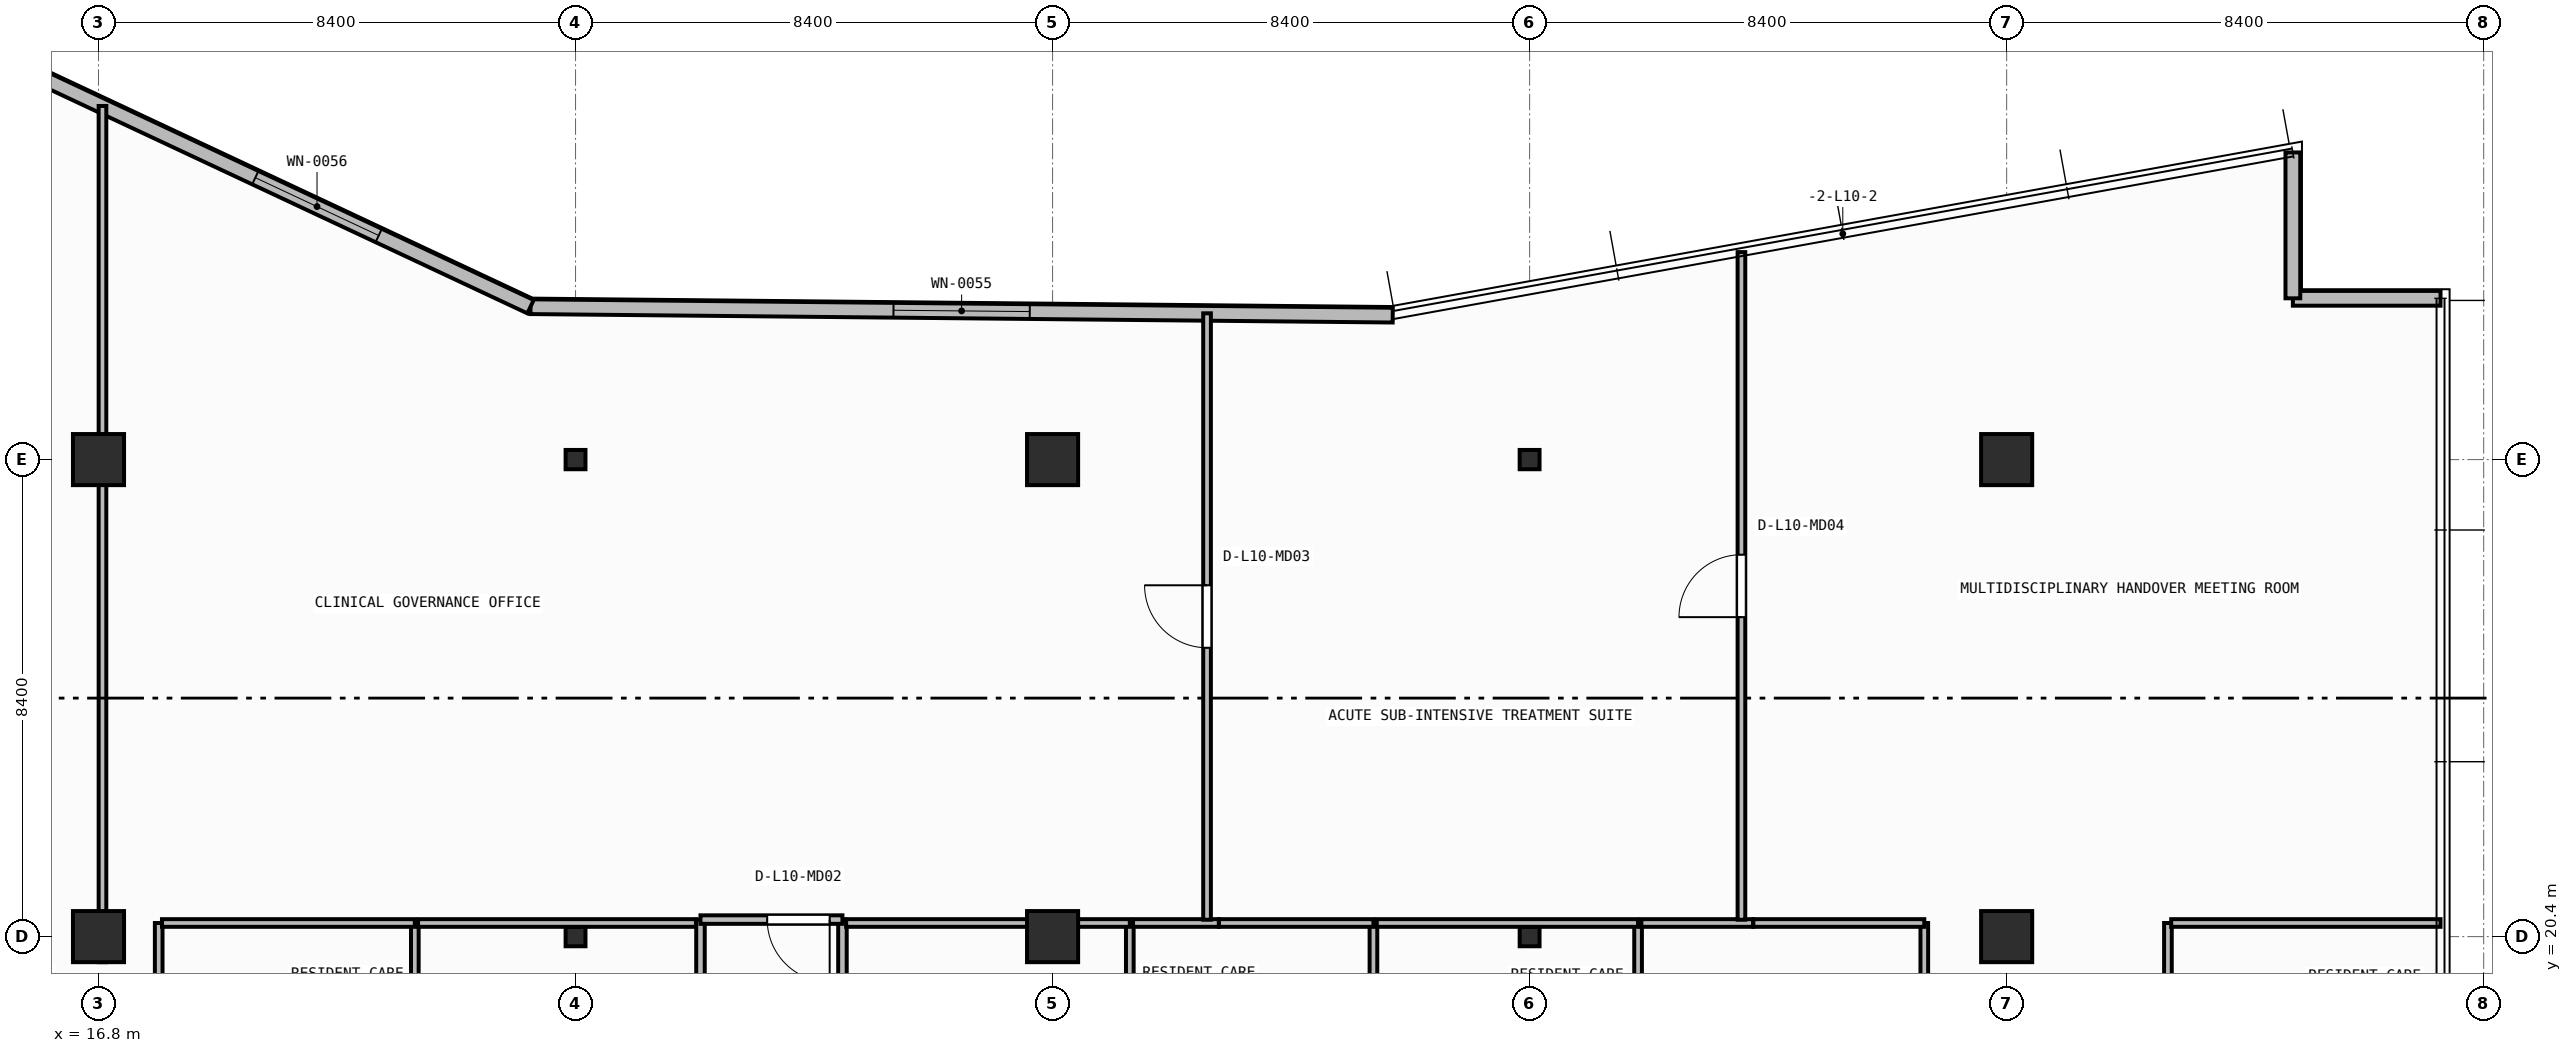
"""IFC4 building model, lengths in metres.
Left out: names, types, materials, properties, quantities, classifications, styles, units other than length and angle.
Written with IfcOpenShell. Run it as: python <this file> out.ifc"""

import sys

from ifc_helpers import new_model, si_unit, direction, frame, frame_2d, origin, origin_2d, place, context, subcontext, project, spatial, rectangle, i_section, extrude, element, fill, save


model = new_model("IFC4")
c1 = context("Model", 3, precision=1e-05, world=origin(), true_north=direction((0.0, 1.0)))
c2 = subcontext(c1, "Body", "Model", "MODEL_VIEW")
j1 = project(units=[si_unit("LENGTHUNIT", "METRE"), si_unit("PLANEANGLEUNIT", "RADIAN")], contexts=[c1])
p1 = place(None, origin())
s1 = spatial("IfcSite", under=j1, at=p1, CompositionType="ELEMENT")
p2 = place(p1, origin())
s2 = spatial("IfcBuilding", under=s1, at=p2, CompositionType="ELEMENT")
p3 = place(p2, frame((0.0, 0.0, 42.25)))
s3 = spatial("IfcBuildingStorey", under=s2, at=p3, CompositionType="ELEMENT", Elevation=42.25)
p4 = place(p3, frame((16.8, 20.4, 0.0), z_axis=(0.0, 0.0, 1.0), x_axis=(1.0, 0.0, 0.0)))
e1 = element("IfcColumn", 1, at=p4, inside=s3, PredefinedType="COLUMN", context=c2, shape_type="SweptSolid", body=[
    extrude(rectangle(XDim=0.9, YDim=0.9, at=origin_2d()), origin(), (0.0, 0.0, 1.0), 3.95),
])
p5 = place(p3, frame((25.2, 20.4, 0.0), z_axis=(0.0, 0.0, 1.0), x_axis=(1.0, 0.0, 0.0)))
e2 = element("IfcColumn", 2, at=p5, inside=s3, PredefinedType="COLUMN", context=c2, shape_type="SweptSolid", body=[
    extrude(i_section(OverallWidth=0.35, OverallDepth=0.34, WebThickness=0.016, FlangeThickness=0.028, at=origin_2d()), origin(), (0.0, 0.0, 1.0), 3.95),
])
p6 = place(p3, frame((33.6, 20.4, 0.0), z_axis=(0.0, 0.0, 1.0), x_axis=(1.0, 0.0, 0.0)))
e3 = element("IfcColumn", 3, at=p6, inside=s3, PredefinedType="COLUMN", context=c2, shape_type="SweptSolid", body=[
    extrude(rectangle(XDim=0.9, YDim=0.9, at=origin_2d()), origin(), (0.0, 0.0, 1.0), 3.95),
])
p7 = place(p3, frame((42.0, 20.4, 0.0), z_axis=(0.0, 0.0, 1.0), x_axis=(1.0, 0.0, 0.0)))
e4 = element("IfcColumn", 4, at=p7, inside=s3, PredefinedType="COLUMN", context=c2, shape_type="SweptSolid", body=[
    extrude(i_section(OverallWidth=0.35, OverallDepth=0.34, WebThickness=0.016, FlangeThickness=0.028, at=origin_2d()), origin(), (0.0, 0.0, 1.0), 3.95),
])
for number, where, z_axis, x_axis in (
    (5, (50.4, 20.4, 0.0), (0.0, 0.0, 1.0), (1.0, 0.0, 0.0)),
    (6, (16.8, 28.8, 0.0), (0.0, 0.0, 1.0), (1.0, 0.0, 0.0)),
):
    element("IfcColumn", number, at=place(p3, frame(where, z_axis=z_axis, x_axis=x_axis)), inside=s3, PredefinedType="COLUMN", context=c2, shape_type="SweptSolid", body=[
        extrude(rectangle(XDim=0.9, YDim=0.9, at=origin_2d()), origin(), (0.0, 0.0, 1.0), 3.95),
    ])
p8 = place(p3, frame((25.2, 28.8, 0.0), z_axis=(0.0, 0.0, 1.0), x_axis=(1.0, 0.0, 0.0)))
e7 = element("IfcColumn", 7, at=p8, inside=s3, PredefinedType="COLUMN", context=c2, shape_type="SweptSolid", body=[
    extrude(i_section(OverallWidth=0.35, OverallDepth=0.34, WebThickness=0.016, FlangeThickness=0.028, at=origin_2d()), origin(), (0.0, 0.0, 1.0), 3.95),
])
p9 = place(p3, frame((33.6, 28.8, 0.0), z_axis=(0.0, 0.0, 1.0), x_axis=(1.0, 0.0, 0.0)))
e8 = element("IfcColumn", 8, at=p9, inside=s3, PredefinedType="COLUMN", context=c2, shape_type="SweptSolid", body=[
    extrude(rectangle(XDim=0.9, YDim=0.9, at=origin_2d()), origin(), (0.0, 0.0, 1.0), 3.95),
])
p10 = place(p3, frame((42.0, 28.8, 0.0), z_axis=(0.0, 0.0, 1.0), x_axis=(1.0, 0.0, 0.0)))
e9 = element("IfcColumn", 9, at=p10, inside=s3, PredefinedType="COLUMN", context=c2, shape_type="SweptSolid", body=[
    extrude(i_section(OverallWidth=0.35, OverallDepth=0.34, WebThickness=0.016, FlangeThickness=0.028, at=origin_2d()), origin(), (0.0, 0.0, 1.0), 3.95),
])
p11 = place(p3, frame((50.4, 28.8, 0.0), z_axis=(0.0, 0.0, 1.0), x_axis=(1.0, 0.0, 0.0)))
e10 = element("IfcColumn", 10, at=p11, inside=s3, PredefinedType="COLUMN", context=c2, shape_type="SweptSolid", body=[
    extrude(rectangle(XDim=0.9, YDim=0.9, at=origin_2d()), origin(), (0.0, 0.0, 1.0), 3.95),
])
p12 = place(p3, frame((58.04, 31.64, 0.0), z_axis=(0.0, 0.0, 1.0), x_axis=(-1.0, 0.0, 0.0)))
e11 = element("IfcWall", 11, at=p12, inside=s3, PredefinedType="STANDARD", context=c2, shape_type="SweptSolid", body=[
    extrude(rectangle(XDim=2.6, YDim=0.26, at=frame_2d((1.3, 0.0))), origin(), (0.0, 0.0, 1.0), 3.71),
])
p13 = place(p3, frame((55.44, 31.64, 0.0), z_axis=(0.0, 0.0, 1.0), x_axis=(0.0, 1.0, 0.0)))
e12 = element("IfcWall", 12, at=p13, inside=s3, PredefinedType="STANDARD", context=c2, shape_type="SweptSolid", body=[
    extrude(rectangle(XDim=2.569, YDim=0.26, at=frame_2d((1.284, 0.0))), origin(), (0.0, 0.0, 1.0), 3.71),
])
p14 = place(p3, frame((39.59, 31.344, 0.0), z_axis=(0.0, 0.0, 1.0), x_axis=(-0.999952362926, 0.009760731435, 0.0)))
e13 = element("IfcWall", 13, at=p14, inside=s3, PredefinedType="STANDARD", context=c2, shape_type="SweptSolid", body=[
    extrude(rectangle(XDim=15.183, YDim=0.26, at=frame_2d((7.591, 0.0))), origin(), (0.0, 0.0, 1.0), 3.71),
])
p15 = place(p14, frame((6.391, 0.0, 0.9)))
e14 = element("IfcOpeningElement", 14, at=p15, cuts=e13, PredefinedType="OPENING", context=c2, shape_type="SweptSolid", body=[
    extrude(rectangle(XDim=2.4, YDim=1.65, at=frame_2d((1.2, 0.825))), frame((0.0, 0.14, 0.0), z_axis=(0.0, -1.0, 0.0), x_axis=(1.0, 0.0, 0.0)), (0.0, 0.0, 1.0), 0.28),
])
p16 = place(p3, frame((24.408, 31.492, 0.0), z_axis=(0.0, 0.0, 1.0), x_axis=(-0.905396522918, 0.424566998585, 0.0)))
e15 = element("IfcWall", 15, at=p16, inside=s3, PredefinedType="STANDARD", context=c2, shape_type="SweptSolid", body=[
    extrude(rectangle(XDim=14.189, YDim=0.26, at=frame_2d((7.095, 0.0))), origin(), (0.0, 0.0, 1.0), 3.71),
])
p17 = place(p16, frame((2.953, 0.0, 0.9)))
e16 = element("IfcOpeningElement", 16, at=p17, cuts=e15, PredefinedType="OPENING", context=c2, shape_type="SweptSolid", body=[
    extrude(rectangle(XDim=2.4, YDim=1.65, at=frame_2d((1.2, 0.825))), frame((0.0, 0.14, 0.0), z_axis=(0.0, -1.0, 0.0), x_axis=(1.0, 0.0, 0.0)), (0.0, 0.0, 1.0), 0.28),
])
p18 = place(p3, frame((27.4, 20.7, 0.0), z_axis=(0.0, 0.0, 1.0), x_axis=(0.0, -1.0, 0.0)))
e17 = element("IfcWall", 17, at=p18, inside=s3, PredefinedType="PARTITIONING", context=c2, shape_type="SweptSolid", body=[
    extrude(rectangle(XDim=6.0, YDim=0.15, at=frame_2d((3.0, 0.0))), origin(), (0.0, 0.0, 1.0), 3.71),
])
p19 = place(p3, frame((29.9, 17.814, 0.0), z_axis=(0.0, 0.0, 1.0), x_axis=(0.0, 1.0, 0.0)))
e18 = element("IfcWall", 18, at=p19, inside=s3, PredefinedType="PARTITIONING", context=c2, shape_type="SweptSolid", body=[
    extrude(rectangle(XDim=2.886, YDim=0.15, at=frame_2d((1.443, 0.0))), origin(), (0.0, 0.0, 1.0), 3.71),
])
p20 = place(p3, frame((29.9, 20.7, 0.0), z_axis=(0.0, 0.0, 1.0), x_axis=(-1.0, 0.0, 0.0)))
e19 = element("IfcWall", 19, at=p20, inside=s3, PredefinedType="PARTITIONING", context=c2, shape_type="SweptSolid", body=[
    extrude(rectangle(XDim=2.5, YDim=0.15, at=frame_2d((1.25, 0.0))), origin(), (0.0, 0.0, 1.0), 3.073),
])
p21 = place(p20, frame((0.225, 0.0, 0.0)))
e20 = element("IfcOpeningElement", 20, at=p21, cuts=e19, PredefinedType="OPENING", context=c2, shape_type="SweptSolid", body=[
    extrude(rectangle(XDim=1.1, YDim=2.1, at=frame_2d((0.55, 1.05))), frame((0.0, 0.085, 0.0), z_axis=(0.0, -1.0, 0.0), x_axis=(1.0, 0.0, 0.0)), (0.0, 0.0, 1.0), 0.17),
])
for number, where, z_axis, x_axis in (
    (21, (17.86, 17.833, 0.0), (0.0, 0.0, 1.0), (0.0, 1.0, 0.0)),
    (22, (22.37, 17.833, 0.0), (0.0, 0.0, 1.0), (0.0, 1.0, 0.0)),
):
    element("IfcWall", number, at=place(p3, frame(where, z_axis=z_axis, x_axis=x_axis)), inside=s3, PredefinedType="PARTITIONING", context=c2, shape_type="SweptSolid", body=[
        extrude(rectangle(XDim=2.807, YDim=0.135, at=frame_2d((1.404, 0.0))), origin(), (0.0, 0.0, 1.0), 3.71),
    ])
p22 = place(p3, frame((22.37, 20.64, 0.0), z_axis=(0.0, 0.0, 1.0), x_axis=(-1.0, 0.0, 0.0)))
e23 = element("IfcWall", 23, at=p22, inside=s3, PredefinedType="PARTITIONING", context=c2, shape_type="SweptSolid", body=[
    extrude(rectangle(XDim=4.453, YDim=0.135, at=frame_2d((2.226, 0.0))), origin(), (0.0, 0.0, 1.0), 3.073),
])
p23 = place(p3, frame((27.32, 20.64, 0.0), z_axis=(0.0, 0.0, 1.0), x_axis=(-1.0, 0.0, 0.0)))
e24 = element("IfcWall", 24, at=p23, inside=s3, PredefinedType="PARTITIONING", context=c2, shape_type="SweptSolid", body=[
    extrude(rectangle(XDim=4.893, YDim=0.135, at=frame_2d((2.446, 0.0))), origin(), (0.0, 0.0, 1.0), 3.073),
])
p24 = place(p3, frame((34.96, 17.833, 0.0), z_axis=(0.0, 0.0, 1.0), x_axis=(0.0, 1.0, 0.0)))
e25 = element("IfcWall", 25, at=p24, inside=s3, PredefinedType="PARTITIONING", context=c2, shape_type="SweptSolid", body=[
    extrude(rectangle(XDim=2.807, YDim=0.135, at=frame_2d((1.404, 0.0))), origin(), (0.0, 0.0, 1.0), 3.71),
])
p25 = place(p3, frame((34.96, 20.64, 0.0), z_axis=(0.0, 0.0, 1.0), x_axis=(-1.0, 0.0, 0.0)))
e26 = element("IfcWall", 26, at=p25, inside=s3, PredefinedType="PARTITIONING", context=c2, shape_type="SweptSolid", body=[
    extrude(rectangle(XDim=4.995, YDim=0.135, at=frame_2d((2.498, 0.0))), origin(), (0.0, 0.0, 1.0), 3.073),
])
p26 = place(p3, frame((39.25, 17.833, 0.0), z_axis=(0.0, 0.0, 1.0), x_axis=(0.0, 1.0, 0.0)))
e27 = element("IfcWall", 27, at=p26, inside=s3, PredefinedType="PARTITIONING", context=c2, shape_type="SweptSolid", body=[
    extrude(rectangle(XDim=2.807, YDim=0.135, at=frame_2d((1.404, 0.0))), origin(), (0.0, 0.0, 1.0), 3.71),
])
p27 = place(p3, frame((36.528, 20.64, 0.0), z_axis=(0.0, 0.0, 1.0), x_axis=(-1.0, 0.0, 0.0)))
e28 = element("IfcWall", 28, at=p27, inside=s3, PredefinedType="PARTITIONING", context=c2, shape_type="SweptSolid", body=[
    extrude(rectangle(XDim=1.51, YDim=0.135, at=frame_2d((0.755, 0.0))), origin(), (0.0, 0.0, 1.0), 3.073),
])
p28 = place(p3, frame((39.25, 20.64, 0.0), z_axis=(0.0, 0.0, 1.0), x_axis=(-1.0, 0.0, 0.0)))
e29 = element("IfcWall", 29, at=p28, inside=s3, PredefinedType="PARTITIONING", context=c2, shape_type="SweptSolid", body=[
    extrude(rectangle(XDim=2.72, YDim=0.135, at=frame_2d((1.36, 0.0))), origin(), (0.0, 0.0, 1.0), 3.073),
])
p29 = place(p3, frame((43.91, 17.833, 0.0), z_axis=(0.0, 0.0, 1.0), x_axis=(0.0, 1.0, 0.0)))
e30 = element("IfcWall", 30, at=p29, inside=s3, PredefinedType="PARTITIONING", context=c2, shape_type="SweptSolid", body=[
    extrude(rectangle(XDim=2.807, YDim=0.135, at=frame_2d((1.404, 0.0))), origin(), (0.0, 0.0, 1.0), 3.71),
])
p30 = place(p3, frame((43.91, 20.64, 0.0), z_axis=(0.0, 0.0, 1.0), x_axis=(-1.0, 0.0, 0.0)))
e31 = element("IfcWall", 31, at=p30, inside=s3, PredefinedType="PARTITIONING", context=c2, shape_type="SweptSolid", body=[
    extrude(rectangle(XDim=4.602, YDim=0.135, at=frame_2d((2.301, 0.0))), origin(), (0.0, 0.0, 1.0), 3.073),
])
p31 = place(p3, frame((48.95, 17.833, 0.0), z_axis=(0.0, 0.0, 1.0), x_axis=(0.0, 1.0, 0.0)))
e32 = element("IfcWall", 32, at=p31, inside=s3, PredefinedType="PARTITIONING", context=c2, shape_type="SweptSolid", body=[
    extrude(rectangle(XDim=2.807, YDim=0.135, at=frame_2d((1.404, 0.0))), origin(), (0.0, 0.0, 1.0), 3.71),
])
p32 = place(p3, frame((45.938, 20.64, 0.0), z_axis=(0.0, 0.0, 1.0), x_axis=(-1.0, 0.0, 0.0)))
e33 = element("IfcWall", 33, at=p32, inside=s3, PredefinedType="PARTITIONING", context=c2, shape_type="SweptSolid", body=[
    extrude(rectangle(XDim=1.97, YDim=0.135, at=frame_2d((0.985, 0.0))), origin(), (0.0, 0.0, 1.0), 3.073),
])
p33 = place(p3, frame((48.95, 20.64, 0.0), z_axis=(0.0, 0.0, 1.0), x_axis=(-1.0, 0.0, 0.0)))
e34 = element("IfcWall", 34, at=p33, inside=s3, PredefinedType="PARTITIONING", context=c2, shape_type="SweptSolid", body=[
    extrude(rectangle(XDim=3.01, YDim=0.135, at=frame_2d((1.505, 0.0))), origin(), (0.0, 0.0, 1.0), 3.073),
])
p34 = place(p3, frame((53.24, 17.833, 0.0), z_axis=(0.0, 0.0, 1.0), x_axis=(0.0, 1.0, 0.0)))
e35 = element("IfcWall", 35, at=p34, inside=s3, PredefinedType="PARTITIONING", context=c2, shape_type="SweptSolid", body=[
    extrude(rectangle(XDim=2.807, YDim=0.135, at=frame_2d((1.404, 0.0))), origin(), (0.0, 0.0, 1.0), 3.71),
])
p35 = place(p3, frame((58.04, 20.64, 0.0), z_axis=(0.0, 0.0, 1.0), x_axis=(-1.0, 0.0, 0.0)))
e36 = element("IfcWall", 36, at=p35, inside=s3, PredefinedType="PARTITIONING", context=c2, shape_type="SweptSolid", body=[
    extrude(rectangle(XDim=4.742, YDim=0.135, at=frame_2d((2.371, 0.0))), origin(), (0.0, 0.0, 1.0), 3.71),
])
p36 = place(p3, frame((16.87, 19.95, 0.0), z_axis=(0.0, 0.0, 1.0), x_axis=(0.0, 1.0, 0.0)))
e37 = element("IfcWall", 37, at=p36, inside=s3, PredefinedType="PARTITIONING", context=c2, shape_type="SweptSolid", body=[
    extrude(rectangle(XDim=15.077, YDim=0.135, at=frame_2d((7.539, 0.0))), origin(), (0.0, 0.0, 1.0), 3.073),
])
p37 = place(p3, frame((36.32, 20.698, 0.0), z_axis=(0.0, 0.0, 1.0), x_axis=(0.0, 1.0, 0.0)))
e38 = element("IfcWall", 38, at=p37, inside=s3, PredefinedType="PARTITIONING", context=c2, shape_type="SweptSolid", body=[
    extrude(rectangle(XDim=10.678, YDim=0.135, at=frame_2d((5.339, 0.0))), origin(), (0.0, 0.0, 1.0), 3.71),
])
p38 = place(p37, frame((4.789, 0.0, 0.0)))
e39 = element("IfcOpeningElement", 39, at=p38, cuts=e38, PredefinedType="OPENING", context=c2, shape_type="SweptSolid", body=[
    extrude(rectangle(XDim=1.1, YDim=2.1, at=frame_2d((0.55, 1.05))), frame((0.0, 0.077, 0.0), z_axis=(0.0, -1.0, 0.0), x_axis=(1.0, 0.0, 0.0)), (0.0, 0.0, 1.0), 0.155),
])
p39 = place(p3, frame((45.73, 20.698, 0.0), z_axis=(0.0, 0.0, 1.0), x_axis=(0.0, 1.0, 0.0)))
e40 = element("IfcWall", 40, at=p39, inside=s3, PredefinedType="PARTITIONING", context=c2, shape_type="SweptSolid", body=[
    extrude(rectangle(XDim=11.756, YDim=0.135, at=frame_2d((5.878, 0.0))), origin(), (0.0, 0.0, 1.0), 3.71),
])
p40 = place(p39, frame((5.328, 0.0, 0.0)))
e41 = element("IfcOpeningElement", 41, at=p40, cuts=e40, PredefinedType="OPENING", context=c2, shape_type="SweptSolid", body=[
    extrude(rectangle(XDim=1.1, YDim=2.1, at=frame_2d((0.55, 1.05))), frame((0.0, 0.077, 0.0), z_axis=(0.0, -1.0, 0.0), x_axis=(1.0, 0.0, 0.0)), (0.0, 0.0, 1.0), 0.155),
])
p41 = place(p15, origin())
e42 = element("IfcWindow", 42, at=p41, inside=s3, PartitioningType="SINGLE_PANEL", PredefinedType="WINDOW", context=c2, shape_type="SweptSolid", body=[
    extrude(rectangle(XDim=2.4, YDim=1.65, at=frame_2d((1.2, 0.825))), frame((0.0, 0.03, 0.0), z_axis=(0.0, -1.0, 0.0), x_axis=(1.0, 0.0, 0.0)), (0.0, 0.0, 1.0), 0.06),
])
fill(e14, e42)
p42 = place(p17, origin())
e43 = element("IfcWindow", 43, at=p42, inside=s3, PartitioningType="SINGLE_PANEL", PredefinedType="WINDOW", context=c2, shape_type="SweptSolid", body=[
    extrude(rectangle(XDim=2.4, YDim=1.65, at=frame_2d((1.2, 0.825))), frame((0.0, 0.03, 0.0), z_axis=(0.0, -1.0, 0.0), x_axis=(1.0, 0.0, 0.0)), (0.0, 0.0, 1.0), 0.06),
])
fill(e16, e43)
p43 = place(p21, origin())
e44 = element("IfcDoor", 44, at=p43, inside=s3, OperationType="SINGLE_SWING_LEFT", PredefinedType="DOOR", context=c2, shape_type="SweptSolid", body=[
    extrude(rectangle(XDim=1.1, YDim=2.1, at=frame_2d((0.55, 1.05))), frame((0.0, 0.025, 0.0), z_axis=(0.0, -1.0, 0.0), x_axis=(1.0, 0.0, 0.0)), (0.0, 0.0, 1.0), 0.05),
])
fill(e20, e44)
p44 = place(p38, origin())
e45 = element("IfcDoor", 45, at=p44, inside=s3, OperationType="SINGLE_SWING_RIGHT", PredefinedType="DOOR", context=c2, shape_type="SweptSolid", body=[
    extrude(rectangle(XDim=1.1, YDim=2.1, at=frame_2d((0.55, 1.05))), frame((0.0, 0.025, 0.0), z_axis=(0.0, -1.0, 0.0), x_axis=(1.0, 0.0, 0.0)), (0.0, 0.0, 1.0), 0.05),
])
fill(e39, e45)
p45 = place(p40, origin())
e46 = element("IfcDoor", 46, at=p45, inside=s3, OperationType="SINGLE_SWING_LEFT", PredefinedType="DOOR", context=c2, shape_type="SweptSolid", body=[
    extrude(rectangle(XDim=1.1, YDim=2.1, at=frame_2d((0.55, 1.05))), frame((0.0, 0.025, 0.0), z_axis=(0.0, -1.0, 0.0), x_axis=(1.0, 0.0, 0.0)), (0.0, 0.0, 1.0), 0.05),
])
fill(e41, e46)
save(model, sys.argv[1])
